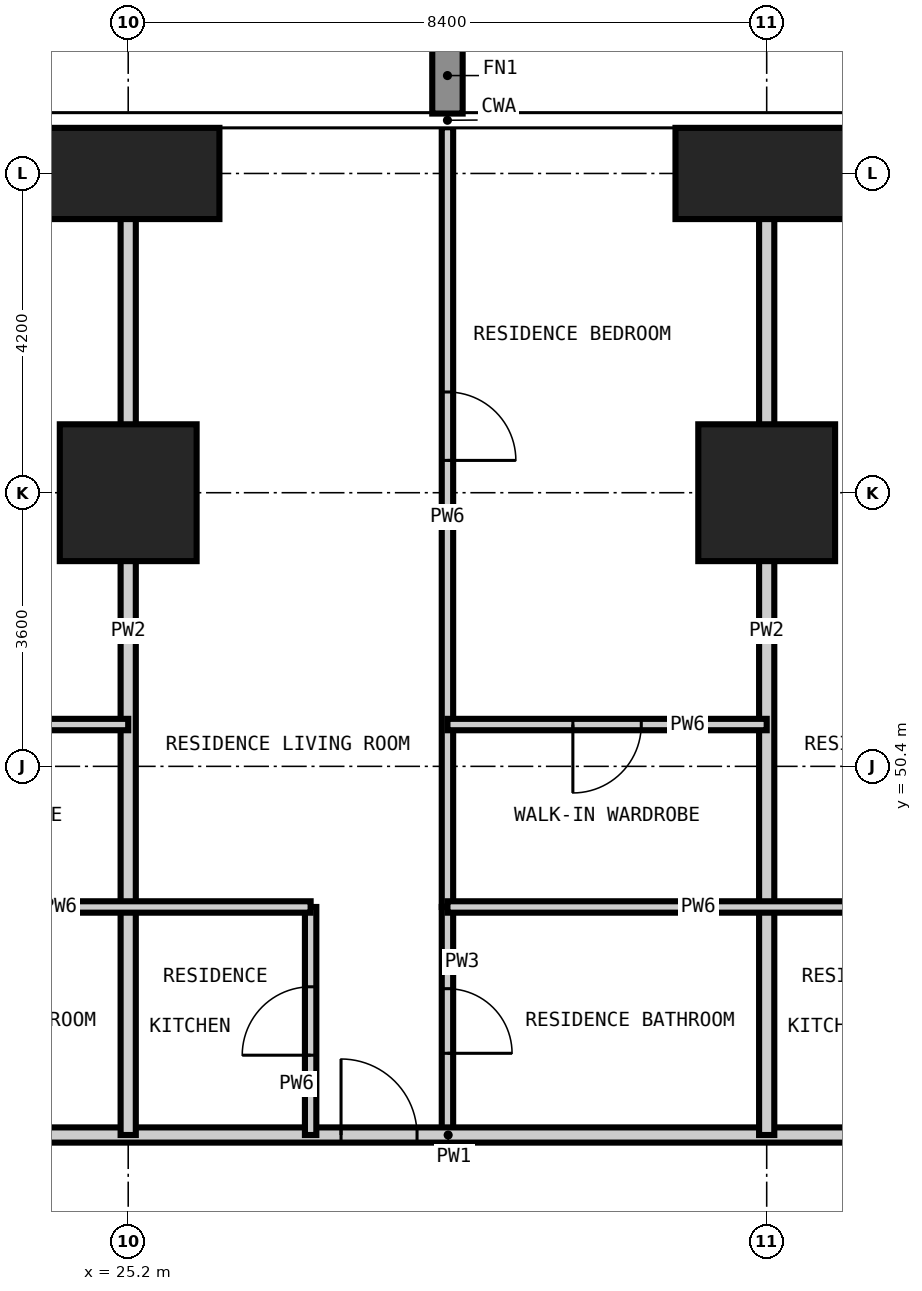
"""IFC4 building model, lengths in metres.
Left out: names, types, materials, properties, quantities, classifications, styles, units other than length and angle.
Written with IfcOpenShell. Run it as: python <this file> out.ifc"""

import sys

from ifc_helpers import new_model, si_unit, direction, frame, frame_2d, origin, origin_2d, place, context, subcontext, project, spatial, rectangle, extrude, element, fill, save


model = new_model("IFC4")
c1 = context("Model", 3, precision=1e-05, world=origin(), true_north=direction((0.0, 1.0)))
c2 = subcontext(c1, "Body", "Model", "MODEL_VIEW")
j1 = project(units=[si_unit("LENGTHUNIT", "METRE"), si_unit("PLANEANGLEUNIT", "RADIAN")], contexts=[c1])
p1 = place(None, origin())
s1 = spatial("IfcSite", under=j1, at=p1, CompositionType="ELEMENT")
p2 = place(p1, origin())
s2 = spatial("IfcBuilding", under=s1, at=p2, CompositionType="ELEMENT")
p3 = place(p2, frame((0.0, 0.0, 45.0)))
s3 = spatial("IfcBuildingStorey", under=s2, at=p3, CompositionType="ELEMENT", Elevation=45.0)
p4 = place(p3, frame((25.2, 54.0, -0.35), z_axis=(0.0, 0.0, 1.0), x_axis=(1.0, 0.0, 0.0)))
e1 = element("IfcColumn", 1, at=p4, inside=s3, PredefinedType="COLUMN", context=c2, shape_type="SweptSolid", body=[
    extrude(rectangle(XDim=1.8, YDim=1.8, at=origin_2d()), origin(), (0.0, 0.0, 1.0), 3.6),
])
p5 = place(p3, frame((25.2, 58.2, -0.35), z_axis=(0.0, 0.0, 1.0), x_axis=(1.0, 0.0, 0.0)))
e2 = element("IfcColumn", 2, at=p5, inside=s3, PredefinedType="COLUMN", context=c2, shape_type="SweptSolid", body=[
    extrude(rectangle(XDim=2.4, YDim=1.2, at=origin_2d()), origin(), (0.0, 0.0, 1.0), 3.6),
])
p6 = place(p3, frame((33.6, 54.0, -0.35), z_axis=(0.0, 0.0, 1.0), x_axis=(1.0, 0.0, 0.0)))
e3 = element("IfcColumn", 3, at=p6, inside=s3, PredefinedType="COLUMN", context=c2, shape_type="SweptSolid", body=[
    extrude(rectangle(XDim=1.8, YDim=1.8, at=origin_2d()), origin(), (0.0, 0.0, 1.0), 3.6),
])
p7 = place(p3, frame((33.6, 58.2, -0.35), z_axis=(0.0, 0.0, 1.0), x_axis=(1.0, 0.0, 0.0)))
e4 = element("IfcColumn", 4, at=p7, inside=s3, PredefinedType="COLUMN", context=c2, shape_type="SweptSolid", body=[
    extrude(rectangle(XDim=2.4, YDim=1.2, at=origin_2d()), origin(), (0.0, 0.0, 1.0), 3.6),
])
p8 = place(p3, frame((29.4, 45.55, 0.0), z_axis=(0.0, 0.0, 1.0), x_axis=(0.0, 1.0, 0.0)))
e5 = element("IfcWall", 5, at=p8, inside=s3, PredefinedType="PARTITIONING", context=c2, shape_type="SweptSolid", body=[
    extrude(rectangle(XDim=3.0, YDim=0.15, at=frame_2d((1.5, 0.0))), origin(), (0.0, 0.0, 1.0), 3.25),
])
p9 = place(p8, frame((1.075, 0.0, 0.0)))
e6 = element("IfcOpeningElement", 6, at=p9, cuts=e5, PredefinedType="OPENING", context=c2, shape_type="SweptSolid", body=[
    extrude(rectangle(XDim=0.85, YDim=2.1, at=frame_2d((0.425, 1.05))), frame((0.0, 0.085, 0.0), z_axis=(0.0, -1.0, 0.0), x_axis=(1.0, 0.0, 0.0)), (0.0, 0.0, 1.0), 0.17),
])
p10 = place(p3, frame((12.95, 45.55, 0.0), z_axis=(0.0, 0.0, 1.0), x_axis=(1.0, 0.0, 0.0)))
e7 = element("IfcWall", 7, at=p10, inside=s3, PredefinedType="PARTITIONING", context=c2, shape_type="SweptSolid", body=[
    extrude(rectangle(XDim=32.3, YDim=0.2, at=frame_2d((16.15, 0.0))), origin(), (0.0, 0.0, 1.0), 3.25),
])
p11 = place(p10, frame((6.65, 0.0, 0.0)))
e8 = element("IfcOpeningElement", 8, at=p11, cuts=e7, PredefinedType="OPENING", context=c2, shape_type="SweptSolid", body=[
    extrude(rectangle(XDim=1.0, YDim=2.2, at=frame_2d((0.5, 1.1))), frame((0.0, 0.11, 0.0), z_axis=(0.0, -1.0, 0.0), x_axis=(1.0, 0.0, 0.0)), (0.0, 0.0, 1.0), 0.22),
])
p12 = place(p10, frame((15.05, 0.0, 0.0)))
e9 = element("IfcOpeningElement", 9, at=p12, cuts=e7, PredefinedType="OPENING", context=c2, shape_type="SweptSolid", body=[
    extrude(rectangle(XDim=1.0, YDim=2.2, at=frame_2d((0.5, 1.1))), frame((0.0, 0.11, 0.0), z_axis=(0.0, -1.0, 0.0), x_axis=(1.0, 0.0, 0.0)), (0.0, 0.0, 1.0), 0.22),
])
p13 = place(p10, frame((23.45, 0.0, 0.0)))
e10 = element("IfcOpeningElement", 10, at=p13, cuts=e7, PredefinedType="OPENING", context=c2, shape_type="SweptSolid", body=[
    extrude(rectangle(XDim=1.0, YDim=2.2, at=frame_2d((0.5, 1.1))), frame((0.0, 0.11, 0.0), z_axis=(0.0, -1.0, 0.0), x_axis=(1.0, 0.0, 0.0)), (0.0, 0.0, 1.0), 0.22),
])
for number, where, z_axis, x_axis in (
    (11, (25.2, 45.55, 0.0), (0.0, 0.0, 1.0), (0.0, 1.0, 0.0)),
    (12, (33.6, 45.55, 0.0), (0.0, 0.0, 1.0), (0.0, 1.0, 0.0)),
):
    element("IfcWall", number, at=place(p3, frame(where, z_axis=z_axis, x_axis=x_axis)), inside=s3, PredefinedType="PARTITIONING", context=c2, shape_type="SweptSolid", body=[
        extrude(rectangle(XDim=13.258, YDim=0.2, at=frame_2d((6.629, 0.0))), origin(), (0.0, 0.0, 1.0), 3.25),
    ])
p14 = place(p3, frame((27.6, 45.55, 0.0), z_axis=(0.0, 0.0, 1.0), x_axis=(0.0, 1.0, 0.0)))
e13 = element("IfcWall", 13, at=p14, inside=s3, PredefinedType="PARTITIONING", context=c2, shape_type="SweptSolid", body=[
    extrude(rectangle(XDim=3.0, YDim=0.15, at=frame_2d((1.5, 0.0))), origin(), (0.0, 0.0, 1.0), 3.25),
])
p15 = place(p14, frame((1.05, 0.0, 0.0)))
e14 = element("IfcOpeningElement", 14, at=p15, cuts=e13, PredefinedType="OPENING", context=c2, shape_type="SweptSolid", body=[
    extrude(rectangle(XDim=0.9, YDim=2.1, at=frame_2d((0.45, 1.05))), frame((0.0, 0.085, 0.0), z_axis=(0.0, -1.0, 0.0), x_axis=(1.0, 0.0, 0.0)), (0.0, 0.0, 1.0), 0.17),
])
p16 = place(p3, frame((29.4, 48.55, 0.0), z_axis=(0.0, 0.0, 1.0), x_axis=(0.0, 1.0, 0.0)))
e15 = element("IfcWall", 15, at=p16, inside=s3, PredefinedType="PARTITIONING", context=c2, shape_type="SweptSolid", body=[
    extrude(rectangle(XDim=10.258, YDim=0.15, at=frame_2d((5.129, 0.0))), origin(), (0.0, 0.0, 1.0), 3.25),
])
p17 = place(p16, frame((5.875, 0.0, 0.0)))
e16 = element("IfcOpeningElement", 16, at=p17, cuts=e15, PredefinedType="OPENING", context=c2, shape_type="SweptSolid", body=[
    extrude(rectangle(XDim=0.9, YDim=2.1, at=frame_2d((0.45, 1.05))), frame((0.0, 0.085, 0.0), z_axis=(0.0, -1.0, 0.0), x_axis=(1.0, 0.0, 0.0)), (0.0, 0.0, 1.0), 0.17),
])
for number, where, z_axis, x_axis in (
    (17, (21.0, 48.55, 0.0), (0.0, 0.0, 1.0), (1.0, 0.0, 0.0)),
    (18, (29.4, 48.55, 0.0), (0.0, 0.0, 1.0), (1.0, 0.0, 0.0)),
):
    element("IfcWall", number, at=place(p3, frame(where, z_axis=z_axis, x_axis=x_axis)), inside=s3, PredefinedType="PARTITIONING", context=c2, shape_type="SweptSolid", body=[
        extrude(rectangle(XDim=6.6, YDim=0.15, at=frame_2d((3.3, 0.0))), origin(), (0.0, 0.0, 1.0), 3.25),
    ])
p18 = place(p3, frame((21.0, 50.95, 0.0), z_axis=(0.0, 0.0, 1.0), x_axis=(1.0, 0.0, 0.0)))
e19 = element("IfcWall", 19, at=p18, inside=s3, PredefinedType="PARTITIONING", context=c2, shape_type="SweptSolid", body=[
    extrude(rectangle(XDim=4.2, YDim=0.15, at=frame_2d((2.1, 0.0))), origin(), (0.0, 0.0, 1.0), 3.25),
])
p19 = place(p18, frame((1.65, 0.0, 0.0)))
e20 = element("IfcOpeningElement", 20, at=p19, cuts=e19, PredefinedType="OPENING", context=c2, shape_type="SweptSolid", body=[
    extrude(rectangle(XDim=0.9, YDim=2.1, at=frame_2d((0.45, 1.05))), frame((0.0, 0.085, 0.0), z_axis=(0.0, -1.0, 0.0), x_axis=(1.0, 0.0, 0.0)), (0.0, 0.0, 1.0), 0.17),
])
p20 = place(p3, frame((29.4, 50.95, 0.0), z_axis=(0.0, 0.0, 1.0), x_axis=(1.0, 0.0, 0.0)))
e21 = element("IfcWall", 21, at=p20, inside=s3, PredefinedType="PARTITIONING", context=c2, shape_type="SweptSolid", body=[
    extrude(rectangle(XDim=4.2, YDim=0.15, at=frame_2d((2.1, 0.0))), origin(), (0.0, 0.0, 1.0), 3.25),
])
p21 = place(p20, frame((1.65, 0.0, 0.0)))
e22 = element("IfcOpeningElement", 22, at=p21, cuts=e21, PredefinedType="OPENING", context=c2, shape_type="SweptSolid", body=[
    extrude(rectangle(XDim=0.9, YDim=2.1, at=frame_2d((0.45, 1.05))), frame((0.0, 0.085, 0.0), z_axis=(0.0, -1.0, 0.0), x_axis=(1.0, 0.0, 0.0)), (0.0, 0.0, 1.0), 0.17),
])
p22 = place(p12, origin())
e23 = element("IfcDoor", 23, at=p22, inside=s3, OperationType="SINGLE_SWING_LEFT", PredefinedType="DOOR", context=c2, shape_type="SweptSolid", body=[
    extrude(rectangle(XDim=1.0, YDim=2.2, at=frame_2d((0.5, 1.1))), frame((0.0, 0.025, 0.0), z_axis=(0.0, -1.0, 0.0), x_axis=(1.0, 0.0, 0.0)), (0.0, 0.0, 1.0), 0.05),
])
fill(e9, e23)
p23 = place(p15, origin())
e24 = element("IfcDoor", 24, at=p23, inside=s3, OperationType="SINGLE_SWING_LEFT", PredefinedType="DOOR", context=c2, shape_type="SweptSolid", body=[
    extrude(rectangle(XDim=0.9, YDim=2.1, at=frame_2d((0.45, 1.05))), frame((0.0, 0.025, 0.0), z_axis=(0.0, -1.0, 0.0), x_axis=(1.0, 0.0, 0.0)), (0.0, 0.0, 1.0), 0.05),
])
fill(e14, e24)
p24 = place(p9, frame((0.85, 0.0, 0.0), z_axis=(0.0, 0.0, 1.0), x_axis=(-1.0, 0.0, 0.0)))
e25 = element("IfcDoor", 25, at=p24, inside=s3, OperationType="SINGLE_SWING_RIGHT", PredefinedType="DOOR", context=c2, shape_type="SweptSolid", body=[
    extrude(rectangle(XDim=0.85, YDim=2.1, at=frame_2d((0.425, 1.05))), frame((0.0, 0.025, 0.0), z_axis=(0.0, -1.0, 0.0), x_axis=(1.0, 0.0, 0.0)), (0.0, 0.0, 1.0), 0.05),
])
fill(e6, e25)
p25 = place(p21, frame((0.9, 0.0, 0.0), z_axis=(0.0, 0.0, 1.0), x_axis=(-1.0, 0.0, 0.0)))
e26 = element("IfcDoor", 26, at=p25, inside=s3, OperationType="SINGLE_SWING_RIGHT", PredefinedType="DOOR", context=c2, shape_type="SweptSolid", body=[
    extrude(rectangle(XDim=0.9, YDim=2.1, at=frame_2d((0.45, 1.05))), frame((0.0, 0.025, 0.0), z_axis=(0.0, -1.0, 0.0), x_axis=(1.0, 0.0, 0.0)), (0.0, 0.0, 1.0), 0.05),
])
fill(e22, e26)
p26 = place(p17, frame((0.9, 0.0, 0.0), z_axis=(0.0, 0.0, 1.0), x_axis=(-1.0, 0.0, 0.0)))
e27 = element("IfcDoor", 27, at=p26, inside=s3, OperationType="SINGLE_SWING_RIGHT", PredefinedType="DOOR", context=c2, shape_type="SweptSolid", body=[
    extrude(rectangle(XDim=0.9, YDim=2.1, at=frame_2d((0.45, 1.05))), frame((0.0, 0.025, 0.0), z_axis=(0.0, -1.0, 0.0), x_axis=(1.0, 0.0, 0.0)), (0.0, 0.0, 1.0), 0.05),
])
fill(e16, e27)
save(model, sys.argv[1])
